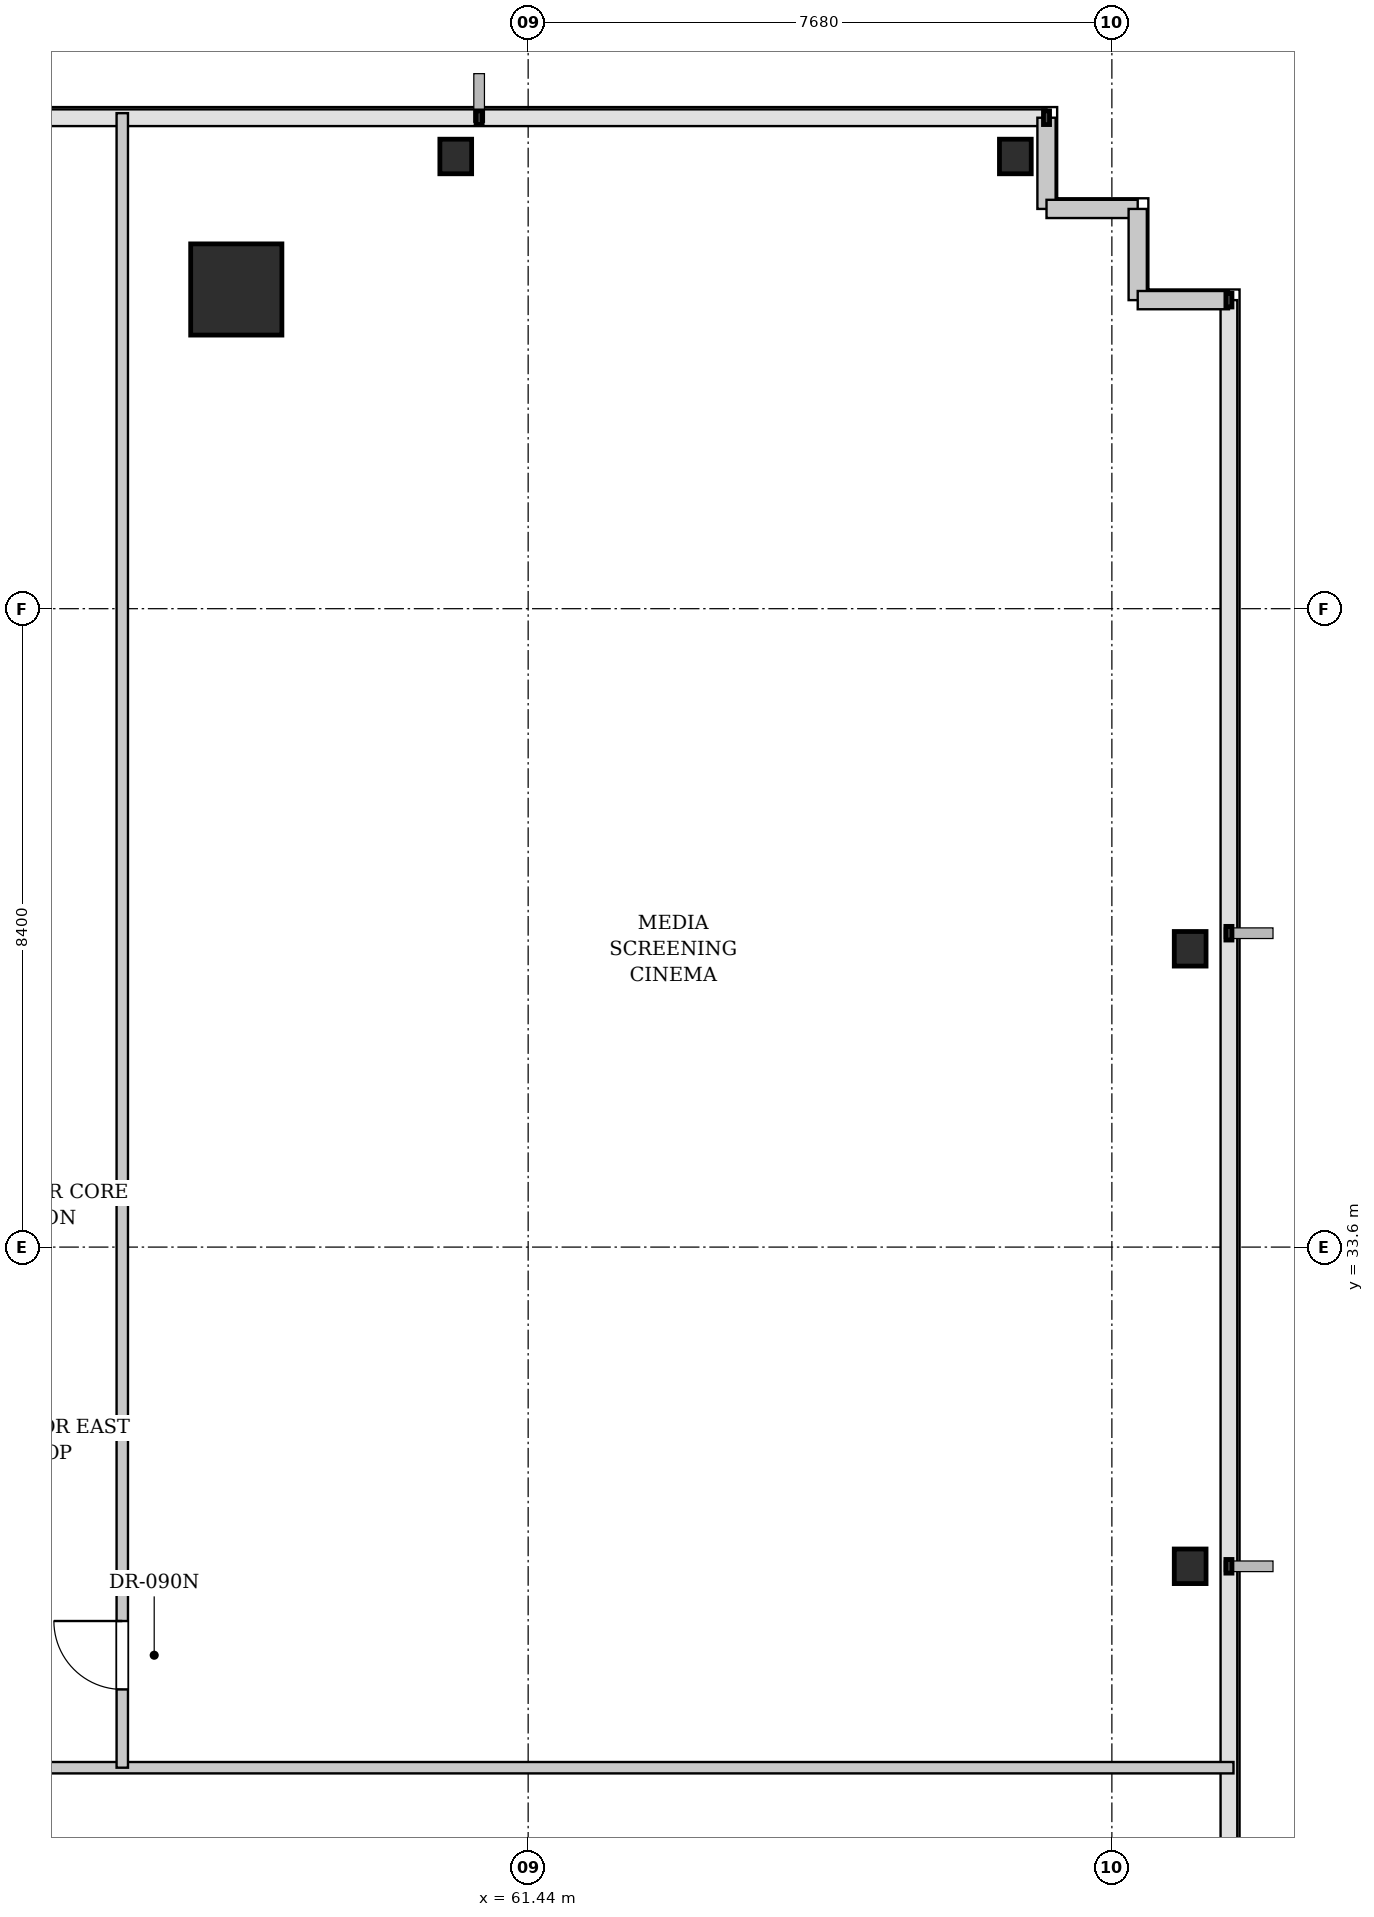
"""IFC4 building model, lengths in metres.
Left out: names, types, materials, properties, quantities, classifications, styles, units other than length and angle.
Written with IfcOpenShell. Run it as: python <this file> out.ifc"""

import sys

from ifc_helpers import new_model, si_unit, direction, frame, frame_2d, origin, origin_2d, place, context, subcontext, project, spatial, rectangle, i_section, extrude, element, fill, save


model = new_model("IFC4")
c1 = context("Model", 3, precision=1e-05, world=origin(), true_north=direction((0.0, 1.0)))
c2 = subcontext(c1, "Body", "Model", "MODEL_VIEW")
j1 = project(units=[si_unit("LENGTHUNIT", "METRE"), si_unit("PLANEANGLEUNIT", "RADIAN")], contexts=[c1])
p1 = place(None, origin())
s1 = spatial("IfcSite", under=j1, at=p1, CompositionType="ELEMENT")
p2 = place(p1, origin())
s2 = spatial("IfcBuilding", under=s1, at=p2, CompositionType="ELEMENT")
p3 = place(p2, frame((0.0, 0.0, 54.2)))
s3 = spatial("IfcBuildingStorey", under=s2, at=p3, CompositionType="ELEMENT", Elevation=54.2)
p4 = place(p3, frame((57.6, 46.2, 0.0), z_axis=(0.0, 0.0, 1.0), x_axis=(1.0, 0.0, 0.0)))
e1 = element("IfcColumn", 1, at=p4, inside=s3, PredefinedType="COLUMN", context=c2, shape_type="SweptSolid", body=[
    extrude(rectangle(XDim=1.2, YDim=1.2, at=origin_2d()), origin(), (0.0, 0.0, 1.0), 3.4),
])
for number, where, z_axis, x_axis in (
    (2, (60.488, 47.95, 0.0), (0.0, 0.0, 1.0), (1.0, 0.0, 0.0)),
    (3, (67.85, 47.95, 0.0), (0.0, 0.0, 1.0), (1.0, 0.0, 0.0)),
    (4, (70.15, 29.4, 0.0), (0.0, 0.0, 1.0), (1.0, 0.0, 0.0)),
    (5, (70.15, 37.525, 0.0), (0.0, 0.0, 1.0), (1.0, 0.0, 0.0)),
):
    element("IfcColumn", number, at=place(p3, frame(where, z_axis=z_axis, x_axis=x_axis)), inside=s3, PredefinedType="COLUMN", context=c2, shape_type="SweptSolid", body=[
        extrude(i_section(OverallWidth=0.418, OverallDepth=0.455, WebThickness=0.042, FlangeThickness=0.068, FilletRadius=0.015, at=origin_2d()), origin(), (0.0, 0.0, 1.0), 3.4),
    ])
for number, where, z_axis, x_axis in (
    (6, (68.26, 48.46, 0.0), (0.0, 0.0, 1.0), (0.0, -1.0, 0.0)),
    (7, (68.26, 47.26, 0.0), (0.0, 0.0, 1.0), (1.0, 0.0, 0.0)),
    (8, (69.46, 47.26, 0.0), (0.0, 0.0, 1.0), (0.0, -1.0, 0.0)),
    (9, (69.46, 46.06, 0.0), (0.0, 0.0, 1.0), (1.0, 0.0, 0.0)),
):
    element("IfcWall", number, at=place(p3, frame(where, z_axis=z_axis, x_axis=x_axis)), inside=s3, PredefinedType="SOLIDWALL", context=c2, shape_type="SweptSolid", body=[
        extrude(rectangle(XDim=1.2, YDim=0.24, at=frame_2d((0.6, 0.0))), origin(), (0.0, 0.0, 1.0), 3.18),
    ])
p5 = place(p3, frame((6.08, 26.75, 0.0), z_axis=(0.0, 0.0, 1.0), x_axis=(1.0, 0.0, 0.0)))
e10 = element("IfcWall", 10, at=p5, inside=s3, PredefinedType="PARTITIONING", context=c2, shape_type="SweptSolid", body=[
    extrude(rectangle(XDim=64.64, YDim=0.15, at=frame_2d((32.32, 0.0))), origin(), (0.0, 0.0, 1.0), 3.18),
])
p6 = place(p5, frame((18.479, 0.0, 0.0)))
e11 = element("IfcOpeningElement", 11, at=p6, cuts=e10, PredefinedType="OPENING", context=c2, shape_type="SweptSolid", body=[
    extrude(rectangle(XDim=1.0, YDim=2.15, at=frame_2d((0.5, 1.075))), frame((0.0, 0.085, 0.0), z_axis=(0.0, -1.0, 0.0), x_axis=(1.0, 0.0, 0.0)), (0.0, 0.0, 1.0), 0.17),
])
p7 = place(p5, frame((22.394, 0.0, 0.0)))
e12 = element("IfcOpeningElement", 12, at=p7, cuts=e10, PredefinedType="OPENING", context=c2, shape_type="SweptSolid", body=[
    extrude(rectangle(XDim=1.0, YDim=2.15, at=frame_2d((0.5, 1.075))), frame((0.0, 0.085, 0.0), z_axis=(0.0, -1.0, 0.0), x_axis=(1.0, 0.0, 0.0)), (0.0, 0.0, 1.0), 0.17),
])
p8 = place(p5, frame((28.206, 0.0, 0.0)))
e13 = element("IfcOpeningElement", 13, at=p8, cuts=e10, PredefinedType="OPENING", context=c2, shape_type="SweptSolid", body=[
    extrude(rectangle(XDim=1.0, YDim=2.15, at=frame_2d((0.5, 1.075))), frame((0.0, 0.085, 0.0), z_axis=(0.0, -1.0, 0.0), x_axis=(1.0, 0.0, 0.0)), (0.0, 0.0, 1.0), 0.17),
])
p9 = place(p5, frame((33.892, 0.0, 0.0)))
e14 = element("IfcOpeningElement", 14, at=p9, cuts=e10, PredefinedType="OPENING", context=c2, shape_type="SweptSolid", body=[
    extrude(rectangle(XDim=1.0, YDim=2.15, at=frame_2d((0.5, 1.075))), frame((0.0, 0.085, 0.0), z_axis=(0.0, -1.0, 0.0), x_axis=(1.0, 0.0, 0.0)), (0.0, 0.0, 1.0), 0.17),
])
p10 = place(p5, frame((37.465, 0.0, 0.0)))
e15 = element("IfcOpeningElement", 15, at=p10, cuts=e10, PredefinedType="OPENING", context=c2, shape_type="SweptSolid", body=[
    extrude(rectangle(XDim=1.0, YDim=2.15, at=frame_2d((0.5, 1.075))), frame((0.0, 0.085, 0.0), z_axis=(0.0, -1.0, 0.0), x_axis=(1.0, 0.0, 0.0)), (0.0, 0.0, 1.0), 0.17),
])
p11 = place(p5, frame((44.76, 0.0, 0.0)))
e16 = element("IfcOpeningElement", 16, at=p11, cuts=e10, PredefinedType="OPENING", context=c2, shape_type="SweptSolid", body=[
    extrude(rectangle(XDim=1.0, YDim=2.15, at=frame_2d((0.5, 1.075))), frame((0.0, 0.085, 0.0), z_axis=(0.0, -1.0, 0.0), x_axis=(1.0, 0.0, 0.0)), (0.0, 0.0, 1.0), 0.17),
])
p12 = place(p3, frame((56.1, 26.75, 0.0), z_axis=(0.0, 0.0, 1.0), x_axis=(0.0, 1.0, 0.0)))
e17 = element("IfcWall", 17, at=p12, inside=s3, PredefinedType="PARTITIONING", context=c2, shape_type="SweptSolid", body=[
    extrude(rectangle(XDim=21.77, YDim=0.15, at=frame_2d((10.885, 0.0))), origin(), (0.0, 0.0, 1.0), 3.18),
])
p13 = place(p12, frame((1.03, 0.0, 0.0)))
e18 = element("IfcOpeningElement", 18, at=p13, cuts=e17, PredefinedType="OPENING", context=c2, shape_type="SweptSolid", body=[
    extrude(rectangle(XDim=0.9, YDim=2.15, at=frame_2d((0.45, 1.075))), frame((0.0, 0.085, 0.0), z_axis=(0.0, -1.0, 0.0), x_axis=(1.0, 0.0, 0.0)), (0.0, 0.0, 1.0), 0.17),
])
p14 = place(p13, origin())
e19 = element("IfcDoor", 19, at=p14, inside=s3, OperationType="SINGLE_SWING_RIGHT", PredefinedType="DOOR", context=c2, shape_type="SweptSolid", body=[
    extrude(rectangle(XDim=0.9, YDim=2.15, at=frame_2d((0.45, 1.075))), frame((0.0, 0.025, 0.0), z_axis=(0.0, -1.0, 0.0), x_axis=(1.0, 0.0, 0.0)), (0.0, 0.0, 1.0), 0.05),
])
fill(e18, e19)
save(model, sys.argv[1])
